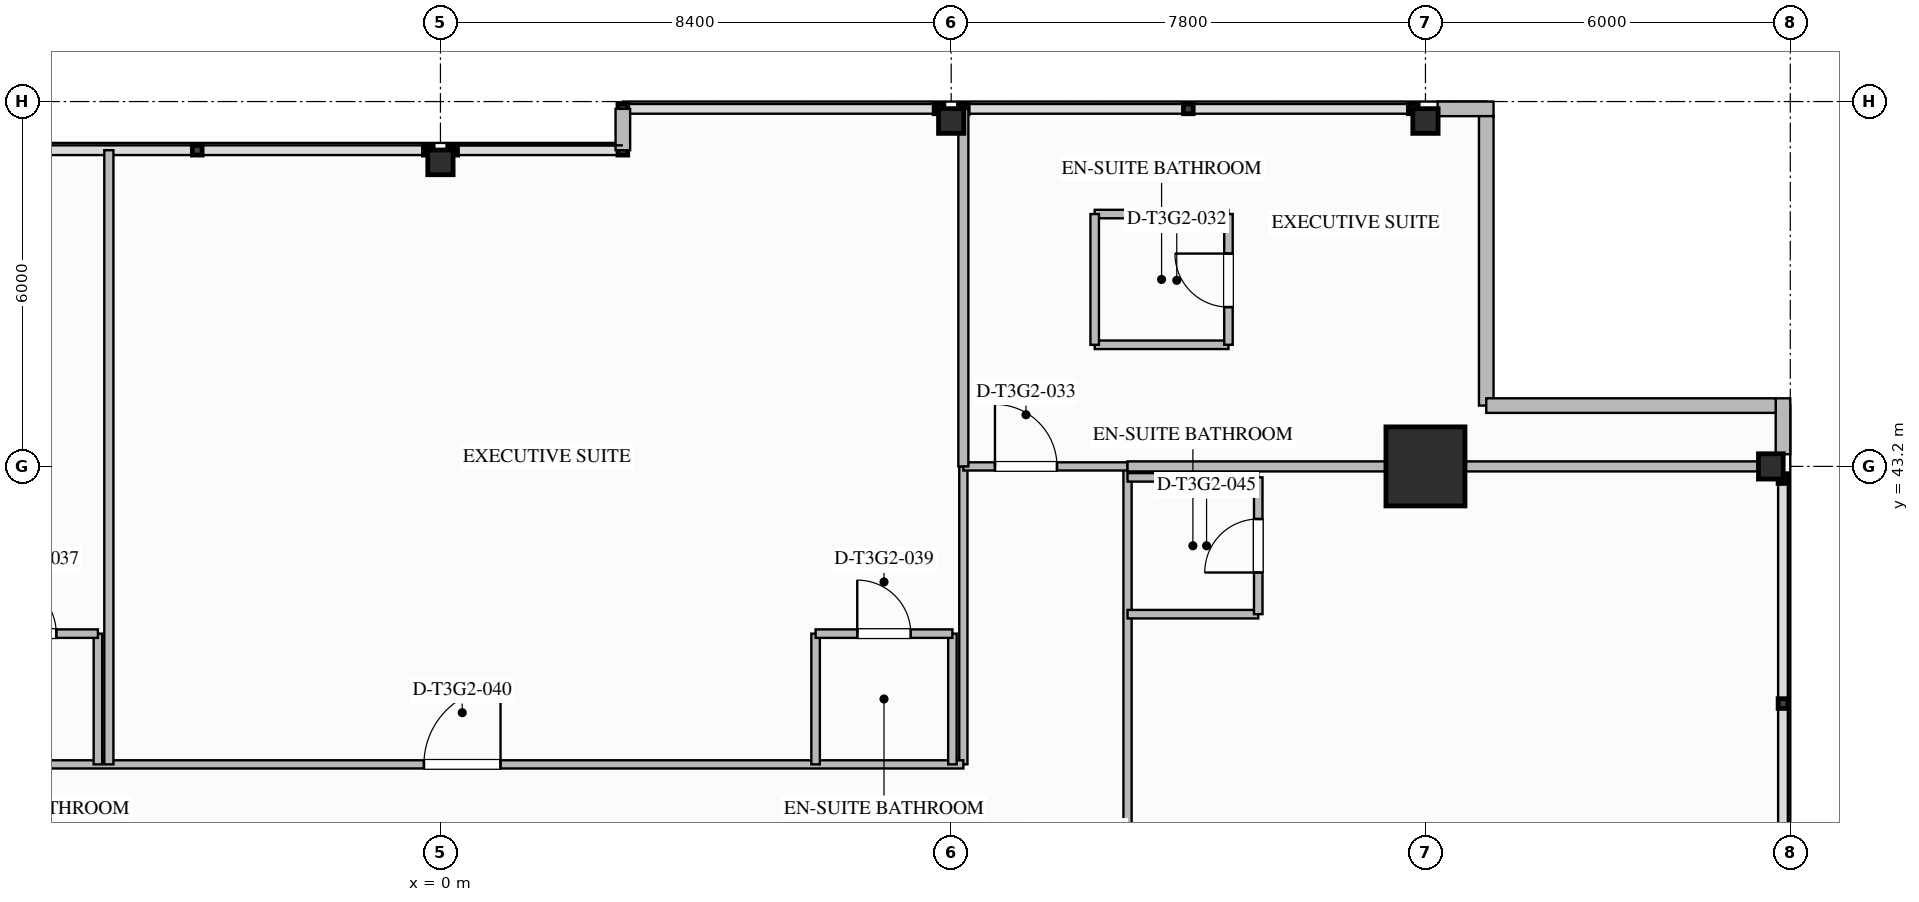
"""IFC4 building model, lengths in metres.
Left out: names, types, materials, properties, quantities, classifications, styles, units other than length and angle.
Written with IfcOpenShell. Run it as: python <this file> out.ifc"""

import sys

from ifc_helpers import new_model, si_unit, direction, frame, frame_2d, origin, origin_2d, place, context, subcontext, project, spatial, rectangle, i_section, extrude, element, fill, save


model = new_model("IFC4")
c1 = context("Model", 3, precision=1e-05, world=origin(), true_north=direction((0.0, 1.0)))
c2 = subcontext(c1, "Body", "Model", "MODEL_VIEW")
j1 = project(units=[si_unit("LENGTHUNIT", "METRE"), si_unit("PLANEANGLEUNIT", "RADIAN")], contexts=[c1])
p1 = place(None, origin())
s1 = spatial("IfcSite", under=j1, at=p1, CompositionType="ELEMENT")
p2 = place(p1, origin())
s2 = spatial("IfcBuilding", under=s1, at=p2, CompositionType="ELEMENT")
p3 = place(p2, frame((0.0, 0.0, 161.05)))
s3 = spatial("IfcBuildingStorey", under=s2, at=p3, CompositionType="ELEMENT", Elevation=161.05)
p4 = place(p3, frame((16.2, 43.2, 0.0), z_axis=(0.0, 0.0, 1.0), x_axis=(1.0, 0.0, 0.0)))
e1 = element("IfcColumn", 1, at=p4, inside=s3, PredefinedType="COLUMN", context=c2, shape_type="SweptSolid", body=[
    extrude(rectangle(XDim=1.3, YDim=1.3, at=origin_2d()), origin(), (0.0, 0.0, 1.0), 3.55),
])
for number, where, z_axis, x_axis in (
    (2, (21.88, 43.2, 0.0), (0.0, 0.0, 1.0), (1.0, 0.0, 0.0)),
    (3, (0.0, 48.2, 0.0), (0.0, 0.0, 1.0), (0.0, 1.0, 0.0)),
    (4, (8.4, 48.88, 0.0), (0.0, 0.0, 1.0), (0.0, 1.0, 0.0)),
    (5, (16.2, 48.88, 0.0), (0.0, 0.0, 1.0), (0.0, 1.0, 0.0)),
):
    element("IfcColumn", number, at=place(p3, frame(where, z_axis=z_axis, x_axis=x_axis)), inside=s3, PredefinedType="COLUMN", context=c2, shape_type="SweptSolid", body=[
        extrude(i_section(OverallWidth=0.406, OverallDepth=0.416, WebThickness=0.03, FlangeThickness=0.048, FilletRadius=0.028, at=origin_2d()), origin(), (0.0, 0.0, 1.0), 3.547),
    ])
for number, where, z_axis, x_axis in (
    (6, (22.08, 44.32, 0.0), (0.0, 0.0, 1.0), (0.0, -1.0, 0.0)),
    (7, (16.4, 49.08, 0.0), (0.0, 0.0, 1.0), (1.0, 0.0, 0.0)),
):
    element("IfcWall", number, at=place(p3, frame(where, z_axis=z_axis, x_axis=x_axis)), inside=s3, PredefinedType="STANDARD", context=c2, shape_type="SweptSolid", body=[
        extrude(rectangle(XDim=0.92, YDim=0.24, at=frame_2d((0.46, 0.0))), origin(), (0.0, 0.0, 1.0), 3.29),
    ])
for number, where, z_axis, x_axis in (
    (8, (17.2, 48.96, 0.0), (0.0, 0.0, 1.0), (0.0, -1.0, 0.0)),
    (9, (17.2, 44.2, 0.0), (0.0, 0.0, 1.0), (1.0, 0.0, 0.0)),
):
    element("IfcWall", number, at=place(p3, frame(where, z_axis=z_axis, x_axis=x_axis)), inside=s3, PredefinedType="STANDARD", context=c2, shape_type="SweptSolid", body=[
        extrude(rectangle(XDim=4.76, YDim=0.24, at=frame_2d((2.38, 0.0))), origin(), (0.0, 0.0, 1.0), 3.29),
    ])
p5 = place(p3, frame((3.0, 48.4, 0.0), z_axis=(0.0, 0.0, 1.0), x_axis=(0.0, 1.0, 0.0)))
e10 = element("IfcWall", 10, at=p5, inside=s3, PredefinedType="STANDARD", context=c2, shape_type="SweptSolid", body=[
    extrude(rectangle(XDim=0.68, YDim=0.24, at=frame_2d((0.34, 0.0))), origin(), (0.0, 0.0, 1.0), 3.29),
])
p6 = place(p3, frame((8.6, 38.3, 0.0), z_axis=(0.0, 0.0, 1.0), x_axis=(0.0, 1.0, 0.0)))
e11 = element("IfcWall", 11, at=p6, inside=s3, PredefinedType="PARTITIONING", context=c2, shape_type="SweptSolid", body=[
    extrude(rectangle(XDim=4.9, YDim=0.135, at=frame_2d((2.45, 0.0))), origin(), (0.0, 0.0, 1.0), 2.667),
])
p7 = place(p3, frame((-16.2, 38.3, 0.0), z_axis=(0.0, 0.0, 1.0), x_axis=(1.0, 0.0, 0.0)))
e12 = element("IfcWall", 12, at=p7, inside=s3, PredefinedType="PARTITIONING", context=c2, shape_type="SweptSolid", body=[
    extrude(rectangle(XDim=24.8, YDim=0.135, at=frame_2d((12.4, 0.0))), origin(), (0.0, 0.0, 1.0), 3.29),
])
p8 = place(p7, frame((3.528, 0.0, 0.0)))
e13 = element("IfcOpeningElement", 13, at=p8, cuts=e12, PredefinedType="OPENING", context=c2, shape_type="SweptSolid", body=[
    extrude(rectangle(XDim=1.26, YDim=2.2, at=frame_2d((0.63, 1.1))), frame((0.0, 0.077, 0.0), z_axis=(0.0, -1.0, 0.0), x_axis=(1.0, 0.0, 0.0)), (0.0, 0.0, 1.0), 0.155),
])
p9 = place(p7, frame((15.928, 0.0, 0.0)))
e14 = element("IfcOpeningElement", 14, at=p9, cuts=e12, PredefinedType="OPENING", context=c2, shape_type="SweptSolid", body=[
    extrude(rectangle(XDim=1.26, YDim=2.2, at=frame_2d((0.63, 1.1))), frame((0.0, 0.077, 0.0), z_axis=(0.0, -1.0, 0.0), x_axis=(1.0, 0.0, 0.0)), (0.0, 0.0, 1.0), 0.155),
])
p10 = place(p3, frame((11.3, 10.8, 0.0), z_axis=(0.0, 0.0, 1.0), x_axis=(0.0, 1.0, 0.0)))
e15 = element("IfcWall", 15, at=p10, inside=s3, PredefinedType="PARTITIONING", context=c2, shape_type="SweptSolid", body=[
    extrude(rectangle(XDim=32.4, YDim=0.135, at=frame_2d((16.2, 0.0))), origin(), (0.0, 0.0, 1.0), 3.29),
])
p11 = place(p10, frame((3.941, 0.0, 0.0)))
e16 = element("IfcOpeningElement", 16, at=p11, cuts=e15, PredefinedType="OPENING", context=c2, shape_type="SweptSolid", body=[
    extrude(rectangle(XDim=1.26, YDim=2.2, at=frame_2d((0.63, 1.1))), frame((0.0, 0.077, 0.0), z_axis=(0.0, -1.0, 0.0), x_axis=(1.0, 0.0, 0.0)), (0.0, 0.0, 1.0), 0.155),
])
p12 = place(p10, frame((14.355, 0.0, 0.0)))
e17 = element("IfcOpeningElement", 17, at=p12, cuts=e15, PredefinedType="OPENING", context=c2, shape_type="SweptSolid", body=[
    extrude(rectangle(XDim=1.26, YDim=2.2, at=frame_2d((0.63, 1.1))), frame((0.0, 0.077, 0.0), z_axis=(0.0, -1.0, 0.0), x_axis=(1.0, 0.0, 0.0)), (0.0, 0.0, 1.0), 0.155),
])
p13 = place(p10, frame((24.769, 0.0, 0.0)))
e18 = element("IfcOpeningElement", 18, at=p13, cuts=e15, PredefinedType="OPENING", context=c2, shape_type="SweptSolid", body=[
    extrude(rectangle(XDim=1.26, YDim=2.2, at=frame_2d((0.63, 1.1))), frame((0.0, 0.077, 0.0), z_axis=(0.0, -1.0, 0.0), x_axis=(1.0, 0.0, 0.0)), (0.0, 0.0, 1.0), 0.155),
])
p14 = place(p3, frame((8.6, 43.2, 0.0), z_axis=(0.0, 0.0, 1.0), x_axis=(1.0, 0.0, 0.0)))
e19 = element("IfcWall", 19, at=p14, inside=s3, PredefinedType="PARTITIONING", context=c2, shape_type="SweptSolid", body=[
    extrude(rectangle(XDim=2.7, YDim=0.135, at=frame_2d((1.35, 0.0))), origin(), (0.0, 0.0, 1.0), 2.58),
])
p15 = place(p14, frame((0.52, 0.0, 0.0)))
e20 = element("IfcOpeningElement", 20, at=p15, cuts=e19, PredefinedType="OPENING", context=c2, shape_type="SweptSolid", body=[
    extrude(rectangle(XDim=1.02, YDim=2.15, at=frame_2d((0.51, 1.075))), frame((0.0, 0.077, 0.0), z_axis=(0.0, -1.0, 0.0), x_axis=(1.0, 0.0, 0.0)), (0.0, 0.0, 1.0), 0.155),
])
p16 = place(p3, frame((8.6, 43.2, 0.0), z_axis=(0.0, 0.0, 1.0), x_axis=(0.0, 1.0, 0.0)))
e21 = element("IfcWall", 21, at=p16, inside=s3, PredefinedType="PARTITIONING", context=c2, shape_type="SweptSolid", body=[
    extrude(rectangle(XDim=5.88, YDim=0.165, at=frame_2d((2.94, 0.0))), origin(), (0.0, 0.0, 1.0), 2.58),
])
p17 = place(p3, frame((11.3, 43.2, 0.0), z_axis=(0.0, 0.0, 1.0), x_axis=(1.0, 0.0, 0.0)))
e22 = element("IfcWall", 22, at=p17, inside=s3, PredefinedType="PARTITIONING", context=c2, shape_type="SweptSolid", body=[
    extrude(rectangle(XDim=10.78, YDim=0.165, at=frame_2d((5.39, 0.0))), origin(), (0.0, 0.0, 1.0), 2.58),
])
for number, where, z_axis, x_axis in (
    (23, (10.76, 45.2, 0.0), (0.0, 0.0, 1.0), (1.0, 0.0, 0.0)),
    (24, (10.76, 47.35, 0.0), (0.0, 0.0, 1.0), (1.0, 0.0, 0.0)),
):
    element("IfcWall", number, at=place(p3, frame(where, z_axis=z_axis, x_axis=x_axis)), inside=s3, PredefinedType="PLUMBINGWALL", context=c2, shape_type="SweptSolid", body=[
        extrude(rectangle(XDim=2.2, YDim=0.14, at=frame_2d((1.1, 0.0))), origin(), (0.0, 0.0, 1.0), 3.29),
    ])
p18 = place(p3, frame((10.76, 45.2, 0.0), z_axis=(0.0, 0.0, 1.0), x_axis=(0.0, 1.0, 0.0)))
e25 = element("IfcWall", 25, at=p18, inside=s3, PredefinedType="PLUMBINGWALL", context=c2, shape_type="SweptSolid", body=[
    extrude(rectangle(XDim=2.15, YDim=0.14, at=frame_2d((1.075, 0.0))), origin(), (0.0, 0.0, 1.0), 3.29),
])
p19 = place(p3, frame((12.96, 45.2, 0.0), z_axis=(0.0, 0.0, 1.0), x_axis=(0.0, 1.0, 0.0)))
e26 = element("IfcWall", 26, at=p19, inside=s3, PredefinedType="PLUMBINGWALL", context=c2, shape_type="SweptSolid", body=[
    extrude(rectangle(XDim=2.15, YDim=0.14, at=frame_2d((1.075, 0.0))), origin(), (0.0, 0.0, 1.0), 3.29),
])
p20 = place(p19, frame((0.62, 0.0, 0.0)))
e27 = element("IfcOpeningElement", 27, at=p20, cuts=e26, PredefinedType="OPENING", context=c2, shape_type="SweptSolid", body=[
    extrude(rectangle(XDim=0.88, YDim=2.1, at=frame_2d((0.44, 1.05))), frame((0.0, 0.08, 0.0), z_axis=(0.0, -1.0, 0.0), x_axis=(1.0, 0.0, 0.0)), (0.0, 0.0, 1.0), 0.16),
])
p21 = place(p3, frame((-5.633, 38.3, 0.0), z_axis=(0.0, 0.0, 1.0), x_axis=(0.0, 1.0, 0.0)))
e28 = element("IfcWall", 28, at=p21, inside=s3, PredefinedType="PLUMBINGWALL", context=c2, shape_type="SweptSolid", body=[
    extrude(rectangle(XDim=2.15, YDim=0.14, at=frame_2d((1.075, 0.0))), origin(), (0.0, 0.0, 1.0), 3.29),
])
p22 = place(p3, frame((-7.883, 40.45, 0.0), z_axis=(0.0, 0.0, 1.0), x_axis=(1.0, 0.0, 0.0)))
e29 = element("IfcWall", 29, at=p22, inside=s3, PredefinedType="PLUMBINGWALL", context=c2, shape_type="SweptSolid", body=[
    extrude(rectangle(XDim=2.25, YDim=0.14, at=frame_2d((1.125, 0.0))), origin(), (0.0, 0.0, 1.0), 3.29),
])
p23 = place(p22, frame((0.685, 0.0, 0.0)))
e30 = element("IfcOpeningElement", 30, at=p23, cuts=e29, PredefinedType="OPENING", context=c2, shape_type="SweptSolid", body=[
    extrude(rectangle(XDim=0.88, YDim=2.1, at=frame_2d((0.44, 1.05))), frame((0.0, 0.08, 0.0), z_axis=(0.0, -1.0, 0.0), x_axis=(1.0, 0.0, 0.0)), (0.0, 0.0, 1.0), 0.16),
])
p24 = place(p3, frame((-5.453, 38.3, 0.0), z_axis=(0.0, 0.0, 1.0), x_axis=(0.0, 1.0, 0.0)))
e31 = element("IfcWall", 31, at=p24, inside=s3, PredefinedType="PARTITIONING", context=c2, shape_type="SweptSolid", body=[
    extrude(rectangle(XDim=10.1, YDim=0.15, at=frame_2d((5.05, 0.0))), origin(), (0.0, 0.0, 1.0), 3.29),
])
p25 = place(p3, frame((6.17, 38.3, 0.0), z_axis=(0.0, 0.0, 1.0), x_axis=(0.0, 1.0, 0.0)))
e32 = element("IfcWall", 32, at=p25, inside=s3, PredefinedType="PLUMBINGWALL", context=c2, shape_type="SweptSolid", body=[
    extrude(rectangle(XDim=2.15, YDim=0.14, at=frame_2d((1.075, 0.0))), origin(), (0.0, 0.0, 1.0), 3.29),
])
p26 = place(p3, frame((8.42, 38.3, 0.0), z_axis=(0.0, 0.0, 1.0), x_axis=(0.0, 1.0, 0.0)))
e33 = element("IfcWall", 33, at=p26, inside=s3, PredefinedType="PLUMBINGWALL", context=c2, shape_type="SweptSolid", body=[
    extrude(rectangle(XDim=2.15, YDim=0.14, at=frame_2d((1.075, 0.0))), origin(), (0.0, 0.0, 1.0), 2.667),
])
p27 = place(p3, frame((6.17, 40.45, 0.0), z_axis=(0.0, 0.0, 1.0), x_axis=(1.0, 0.0, 0.0)))
e34 = element("IfcWall", 34, at=p27, inside=s3, PredefinedType="PLUMBINGWALL", context=c2, shape_type="SweptSolid", body=[
    extrude(rectangle(XDim=2.25, YDim=0.14, at=frame_2d((1.125, 0.0))), origin(), (0.0, 0.0, 1.0), 3.29),
])
p28 = place(p27, frame((0.685, 0.0, 0.0)))
e35 = element("IfcOpeningElement", 35, at=p28, cuts=e34, PredefinedType="OPENING", context=c2, shape_type="SweptSolid", body=[
    extrude(rectangle(XDim=0.88, YDim=2.1, at=frame_2d((0.44, 1.05))), frame((0.0, 0.08, 0.0), z_axis=(0.0, -1.0, 0.0), x_axis=(1.0, 0.0, 0.0)), (0.0, 0.0, 1.0), 0.16),
])
p29 = place(p3, frame((11.3, 40.77, 0.0), z_axis=(0.0, 0.0, 1.0), x_axis=(1.0, 0.0, 0.0)))
e36 = element("IfcWall", 36, at=p29, inside=s3, PredefinedType="PLUMBINGWALL", context=c2, shape_type="SweptSolid", body=[
    extrude(rectangle(XDim=2.15, YDim=0.14, at=frame_2d((1.075, 0.0))), origin(), (0.0, 0.0, 1.0), 3.29),
])
p30 = place(p3, frame((11.3, 43.02, 0.0), z_axis=(0.0, 0.0, 1.0), x_axis=(1.0, 0.0, 0.0)))
e37 = element("IfcWall", 37, at=p30, inside=s3, PredefinedType="PLUMBINGWALL", context=c2, shape_type="SweptSolid", body=[
    extrude(rectangle(XDim=2.15, YDim=0.14, at=frame_2d((1.075, 0.0))), origin(), (0.0, 0.0, 1.0), 2.58),
])
p31 = place(p3, frame((13.45, 40.77, 0.0), z_axis=(0.0, 0.0, 1.0), x_axis=(0.0, 1.0, 0.0)))
e38 = element("IfcWall", 38, at=p31, inside=s3, PredefinedType="PLUMBINGWALL", context=c2, shape_type="SweptSolid", body=[
    extrude(rectangle(XDim=2.25, YDim=0.14, at=frame_2d((1.125, 0.0))), origin(), (0.0, 0.0, 1.0), 3.29),
])
p32 = place(p31, frame((0.685, 0.0, 0.0)))
e39 = element("IfcOpeningElement", 39, at=p32, cuts=e38, PredefinedType="OPENING", context=c2, shape_type="SweptSolid", body=[
    extrude(rectangle(XDim=0.88, YDim=2.1, at=frame_2d((0.44, 1.05))), frame((0.0, 0.08, 0.0), z_axis=(0.0, -1.0, 0.0), x_axis=(1.0, 0.0, 0.0)), (0.0, 0.0, 1.0), 0.16),
])
p33 = place(p20, origin())
e40 = element("IfcDoor", 40, at=p33, inside=s3, OperationType="SINGLE_SWING_RIGHT", PredefinedType="DOOR", context=c2, shape_type="SweptSolid", body=[
    extrude(rectangle(XDim=0.88, YDim=2.1, at=frame_2d((0.44, 1.05))), frame((0.0, 0.025, 0.0), z_axis=(0.0, -1.0, 0.0), x_axis=(1.0, 0.0, 0.0)), (0.0, 0.0, 1.0), 0.05),
])
fill(e27, e40)
p34 = place(p15, origin())
e41 = element("IfcDoor", 41, at=p34, inside=s3, OperationType="SINGLE_SWING_LEFT", PredefinedType="DOOR", context=c2, shape_type="SweptSolid", body=[
    extrude(rectangle(XDim=1.02, YDim=2.15, at=frame_2d((0.51, 1.075))), frame((0.0, 0.025, 0.0), z_axis=(0.0, -1.0, 0.0), x_axis=(1.0, 0.0, 0.0)), (0.0, 0.0, 1.0), 0.05),
])
fill(e20, e41)
p35 = place(p23, origin())
e42 = element("IfcDoor", 42, at=p35, inside=s3, OperationType="SINGLE_SWING_LEFT", PredefinedType="DOOR", context=c2, shape_type="SweptSolid", body=[
    extrude(rectangle(XDim=0.88, YDim=2.1, at=frame_2d((0.44, 1.05))), frame((0.0, 0.025, 0.0), z_axis=(0.0, -1.0, 0.0), x_axis=(1.0, 0.0, 0.0)), (0.0, 0.0, 1.0), 0.05),
])
fill(e30, e42)
p36 = place(p28, origin())
e43 = element("IfcDoor", 43, at=p36, inside=s3, OperationType="SINGLE_SWING_LEFT", PredefinedType="DOOR", context=c2, shape_type="SweptSolid", body=[
    extrude(rectangle(XDim=0.88, YDim=2.1, at=frame_2d((0.44, 1.05))), frame((0.0, 0.025, 0.0), z_axis=(0.0, -1.0, 0.0), x_axis=(1.0, 0.0, 0.0)), (0.0, 0.0, 1.0), 0.05),
])
fill(e35, e43)
p37 = place(p9, origin())
e44 = element("IfcDoor", 44, at=p37, inside=s3, OperationType="SINGLE_SWING_RIGHT", PredefinedType="DOOR", context=c2, shape_type="SweptSolid", body=[
    extrude(rectangle(XDim=1.26, YDim=2.2, at=frame_2d((0.63, 1.1))), frame((0.0, 0.025, 0.0), z_axis=(0.0, -1.0, 0.0), x_axis=(1.0, 0.0, 0.0)), (0.0, 0.0, 1.0), 0.05),
])
fill(e14, e44)
p38 = place(p32, origin())
e45 = element("IfcDoor", 45, at=p38, inside=s3, OperationType="SINGLE_SWING_LEFT", PredefinedType="DOOR", context=c2, shape_type="SweptSolid", body=[
    extrude(rectangle(XDim=0.88, YDim=2.1, at=frame_2d((0.44, 1.05))), frame((0.0, 0.025, 0.0), z_axis=(0.0, -1.0, 0.0), x_axis=(1.0, 0.0, 0.0)), (0.0, 0.0, 1.0), 0.05),
])
fill(e39, e45)
save(model, sys.argv[1])
